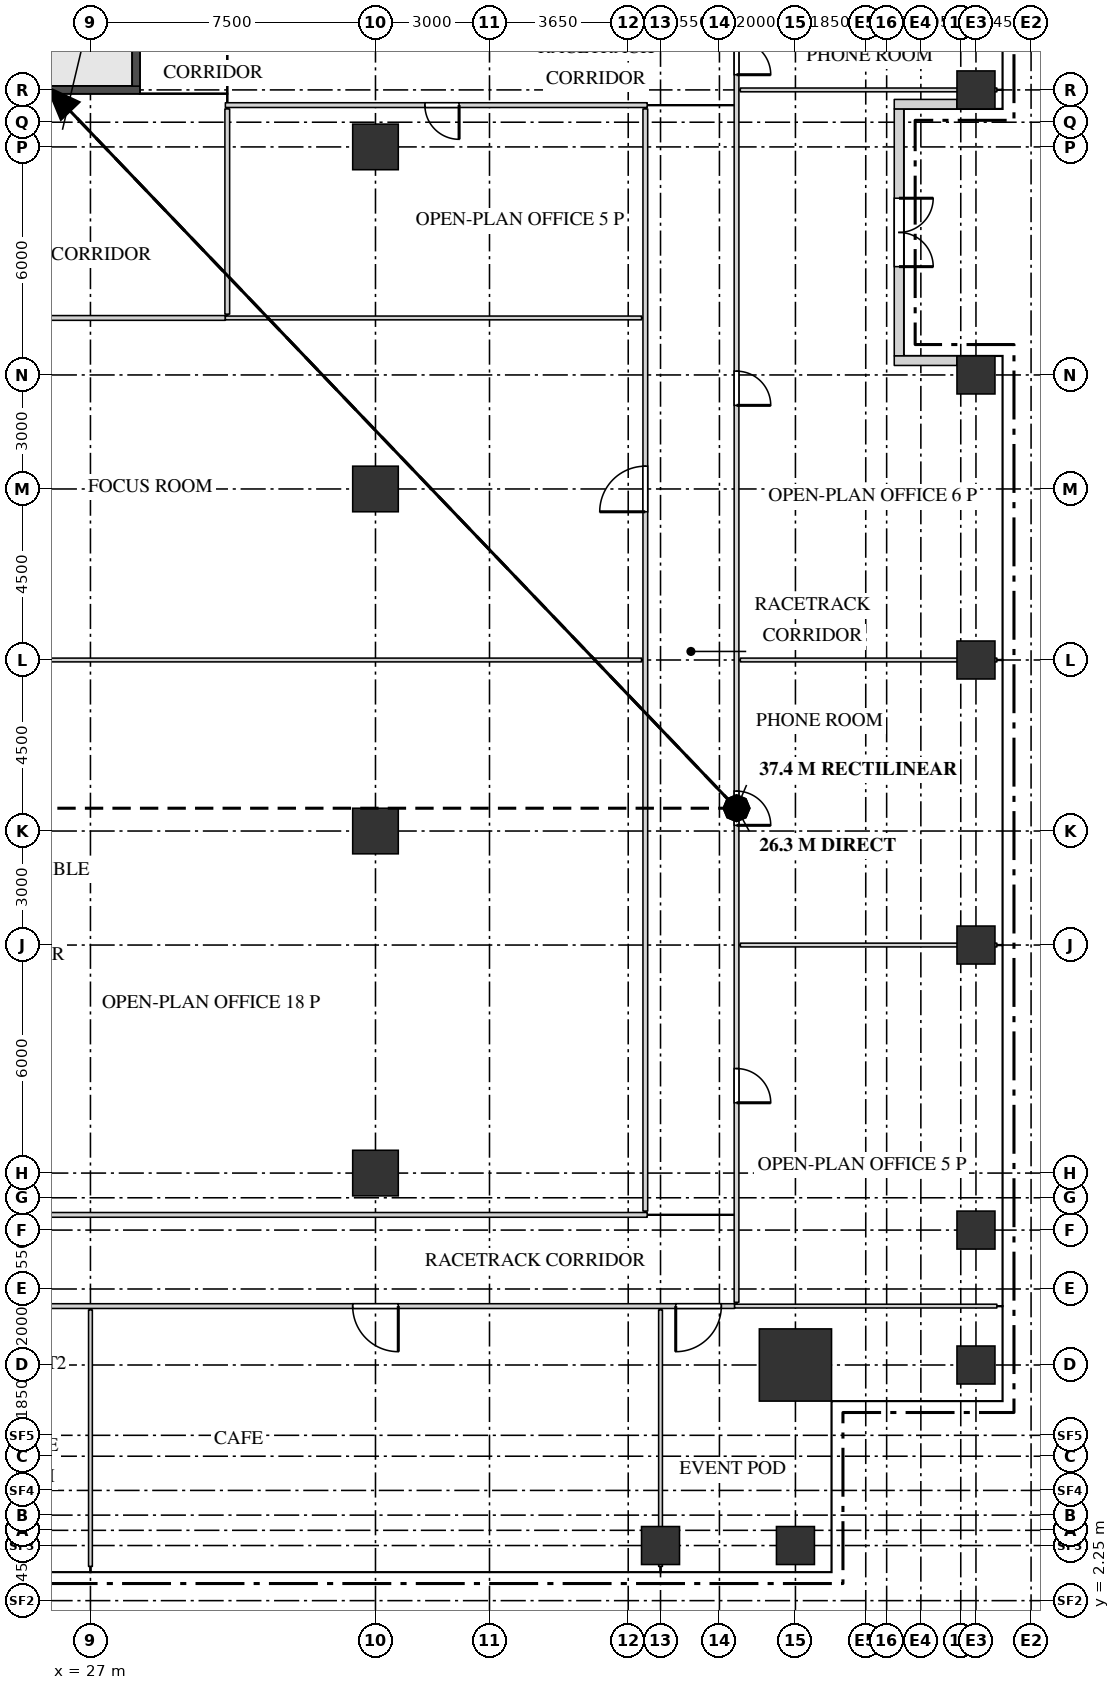
"""IFC4 building model, lengths in metres.
Left out: names, types, materials, properties, quantities, classifications, styles, units other than length and angle.
Written with IfcOpenShell. Run it as: python <this file> out.ifc"""

import sys

from ifc_helpers import new_model, si_unit, direction, frame, frame_2d, origin, origin_2d, place, context, subcontext, project, spatial, rectangle, extrude, source, transform, mapped, element, fill, save


model = new_model("IFC4")
c1 = context("Model", 3, precision=1e-05, world=origin(), true_north=direction((0.0, 1.0)))
c2 = subcontext(c1, "Body", "Model", "MODEL_VIEW")
j1 = project(units=[si_unit("LENGTHUNIT", "METRE"), si_unit("PLANEANGLEUNIT", "RADIAN")], contexts=[c1])
p1 = place(None, origin())
s1 = spatial("IfcSite", under=j1, at=p1, CompositionType="ELEMENT")
p2 = place(p1, origin())
s2 = spatial("IfcBuilding", under=s1, at=p2, CompositionType="ELEMENT")
p3 = place(p2, frame((0.0, 0.0, 188.7)))
s3 = spatial("IfcBuildingStorey", under=s2, at=p3, CompositionType="ELEMENT", Elevation=188.7)
m1 = source(origin(), c2, "Body", "SweptSolid", [
    extrude(rectangle(XDim=7.1, YDim=0.2, at=frame_2d((3.55, 0.0))), origin(), (0.0, 0.0, 1.0), 3.75),
])
p4 = place(p3, frame((21.2, 42.0, 0.0), z_axis=(0.0, 0.0, 1.0), x_axis=(1.0, 0.0, 0.0)))
e1 = element("IfcWall", 1, at=p4, inside=s3, PredefinedType="SHEAR", context=c2, shape_type="MappedRepresentation", body=[
    mapped(m1, transform((0.0, 0.0, 0.0))),
])
m2 = source(origin(), c2, "Body", "SweptSolid", [
    extrude(rectangle(XDim=3.35, YDim=0.2, at=frame_2d((1.675, 0.0))), origin(), (0.0, 0.0, 1.0), 3.75),
])
p5 = place(p3, frame((28.2, 42.1, 0.0), z_axis=(0.0, 0.0, 1.0), x_axis=(0.0, 1.0, 0.0)))
e2 = element("IfcWall", 2, at=p5, inside=s3, PredefinedType="SHEAR", context=c2, shape_type="MappedRepresentation", body=[
    mapped(m2, transform((0.0, 0.0, 0.0))),
])
m3 = source(origin(), c2, "Body", "SweptSolid", [
    extrude(rectangle(XDim=1.9, YDim=1.9, at=origin_2d()), origin(), (0.0, 0.0, 1.0), 4.0),
])
p6 = place(p3, frame((45.55, 8.45, 0.0), z_axis=(0.0, 0.0, 1.0), x_axis=(1.0, 0.0, 0.0)))
e3 = element("IfcColumn", 3, at=p6, inside=s3, PredefinedType="COLUMN", context=c2, shape_type="MappedRepresentation", body=[
    mapped(m3, transform((0.0, 0.0, 0.0))),
])
m4 = source(origin(), c2, "Body", "SweptSolid", [
    extrude(rectangle(XDim=1.0, YDim=1.0, at=origin_2d()), origin(), (0.0, 0.0, 1.0), 3.75),
])
for number, where, z_axis, x_axis in (
    (4, (42.0, 3.7, 0.0), (0.0, 0.0, 1.0), (1.0, 0.0, 0.0)),
    (5, (45.55, 3.7, 0.0), (0.0, 0.0, 1.0), (1.0, 0.0, 0.0)),
    (6, (50.3, 8.45, 0.0), (0.0, 0.0, 1.0), (1.0, 0.0, 0.0)),
    (7, (50.3, 12.0, 0.0), (0.0, 0.0, 1.0), (1.0, 0.0, 0.0)),
    (8, (50.3, 19.5, 0.0), (0.0, 0.0, 1.0), (1.0, 0.0, 0.0)),
    (9, (50.3, 27.0, 0.0), (0.0, 0.0, 1.0), (1.0, 0.0, 0.0)),
    (10, (50.3, 34.5, 0.0), (0.0, 0.0, 1.0), (1.0, 0.0, 0.0)),
    (11, (50.3, 42.0, 0.0), (0.0, 0.0, 1.0), (1.0, 0.0, 0.0)),
):
    element("IfcColumn", number, at=place(p3, frame(where, z_axis=z_axis, x_axis=x_axis)), inside=s3, PredefinedType="COLUMN", context=c2, shape_type="MappedRepresentation", body=[
        mapped(m4, transform((0.0, 0.0, 0.0))),
    ])
m5 = source(origin(), c2, "Body", "SweptSolid", [
    extrude(rectangle(XDim=1.2, YDim=1.2, at=origin_2d()), origin(), (0.0, 0.0, 1.0), 3.75),
])
for number, where, z_axis, x_axis in (
    (12, (34.5, 13.5, 0.0), (0.0, 0.0, 1.0), (1.0, 0.0, 0.0)),
    (13, (34.5, 22.5, 0.0), (0.0, 0.0, 1.0), (1.0, 0.0, 0.0)),
    (14, (34.5, 31.5, 0.0), (0.0, 0.0, 1.0), (1.0, 0.0, 0.0)),
    (15, (34.5, 40.5, 0.0), (0.0, 0.0, 1.0), (1.0, 0.0, 0.0)),
):
    element("IfcColumn", number, at=place(p3, frame(where, z_axis=z_axis, x_axis=x_axis)), inside=s3, PredefinedType="COLUMN", context=c2, shape_type="MappedRepresentation", body=[
        mapped(m5, transform((0.0, 0.0, 0.0))),
    ])
m6 = source(origin(), c2, "Body", "SweptSolid", [
    extrude(rectangle(XDim=6.5, YDim=0.25, at=frame_2d((3.25, 0.0))), origin(), (0.0, 0.0, 1.0), 3.15),
])
p7 = place(p3, frame((48.275, 35.0, 0.0), z_axis=(0.0, 0.0, 1.0), x_axis=(0.0, 1.0, 0.0)))
e16 = element("IfcWall", 16, at=p7, inside=s3, PredefinedType="SOLIDWALL", context=c2, shape_type="MappedRepresentation", body=[
    mapped(m6, transform((0.0, 0.0, 0.0))),
])
m7 = source(origin(), c2, "Body", "SweptSolid", [
    extrude(rectangle(XDim=1.75, YDim=2.4, at=frame_2d((0.875, 1.2))), frame((0.0, 0.135, 0.0), z_axis=(0.0, -1.0, 0.0), x_axis=(1.0, 0.0, 0.0)), (0.0, 0.0, 1.0), 0.27),
])
p8 = place(p7, frame((0.3, 0.0, 0.0)))
e17 = element("IfcOpeningElement", 17, at=p8, cuts=e16, PredefinedType="OPENING", context=c2, shape_type="MappedRepresentation", body=[
    mapped(m7, transform((0.0, 0.0, 0.0))),
])
p9 = place(p7, frame((4.45, 0.0, 0.0)))
e18 = element("IfcOpeningElement", 18, at=p9, cuts=e16, PredefinedType="OPENING", context=c2, shape_type="MappedRepresentation", body=[
    mapped(m7, transform((0.0, 0.0, 0.0))),
])
m8 = source(origin(), c2, "Body", "SweptSolid", [
    extrude(rectangle(XDim=1.8, YDim=2.4, at=frame_2d((0.9, 1.2))), frame((0.0, 0.135, 0.0), z_axis=(0.0, -1.0, 0.0), x_axis=(1.0, 0.0, 0.0)), (0.0, 0.0, 1.0), 0.27),
])
p10 = place(p7, frame((2.35, 0.0, 0.0)))
e19 = element("IfcOpeningElement", 19, at=p10, cuts=e16, PredefinedType="OPENING", context=c2, shape_type="MappedRepresentation", body=[
    mapped(m8, transform((0.0, 0.0, 0.0))),
])
m9 = source(origin(), c2, "Body", "SweptSolid", [
    extrude(rectangle(XDim=1.65, YDim=0.25, at=frame_2d((0.825, 0.0))), origin(), (0.0, 0.0, 1.0), 3.15),
])
for number, where, z_axis, x_axis in (
    (20, (49.8, 34.875, 0.0), (0.0, 0.0, 1.0), (-1.0, 0.0, 0.0)),
    (21, (49.8, 41.625, 0.0), (0.0, 0.0, 1.0), (-1.0, 0.0, 0.0)),
):
    element("IfcWall", number, at=place(p3, frame(where, z_axis=z_axis, x_axis=x_axis)), inside=s3, PredefinedType="SOLIDWALL", context=c2, shape_type="MappedRepresentation", body=[
        mapped(m9, transform((0.0, 0.0, 0.0))),
    ])
m10 = source(origin(), c2, "Body", "SweptSolid", [
    extrude(rectangle(XDim=6.75, YDim=0.1, at=frame_2d((3.375, 0.0))), origin(), (0.0, 0.0, 1.0), 3.3),
])
for number, where, z_axis, x_axis in (
    (22, (27.0, 3.15, 0.0), (0.0, 0.0, 1.0), (0.0, 1.0, 0.0)),
    (23, (42.0, 3.15, 0.0), (0.0, 0.0, 1.0), (0.0, 1.0, 0.0)),
):
    element("IfcWall", number, at=place(p3, frame(where, z_axis=z_axis, x_axis=x_axis)), inside=s3, PredefinedType="PARTITIONING", context=c2, shape_type="MappedRepresentation", body=[
        mapped(m10, transform((0.0, 0.0, 0.0))),
    ])
m11 = source(origin(), c2, "Body", "SweptSolid", [
    extrude(rectangle(XDim=20.6, YDim=0.125, at=frame_2d((10.3, 0.0))), origin(), (0.0, 0.0, 1.0), 3.8),
])
p11 = place(p3, frame((23.35, 10.0, 0.0), z_axis=(0.0, 0.0, 1.0), x_axis=(1.0, 0.0, 0.0)))
e24 = element("IfcWall", 24, at=p11, inside=s3, PredefinedType="PARTITIONING", context=c2, shape_type="MappedRepresentation", body=[
    mapped(m11, transform((0.0, 0.0, 0.0))),
])
m12 = source(origin(), c2, "Body", "SweptSolid", [
    extrude(rectangle(XDim=0.9, YDim=2.1, at=frame_2d((0.45, 1.05))), frame((0.0, 0.073, 0.0), z_axis=(0.0, -1.0, 0.0), x_axis=(1.0, 0.0, 0.0)), (0.0, 0.0, 1.0), 0.145),
])
p12 = place(p11, frame((1.25, 0.0, 0.0)))
e25 = element("IfcOpeningElement", 25, at=p12, cuts=e24, PredefinedType="OPENING", context=c2, shape_type="MappedRepresentation", body=[
    mapped(m12, transform((0.0, 0.0, 0.0))),
])
m13 = source(origin(), c2, "Body", "SweptSolid", [
    extrude(rectangle(XDim=1.2, YDim=2.1, at=frame_2d((0.6, 1.05))), frame((0.0, 0.073, 0.0), z_axis=(0.0, -1.0, 0.0), x_axis=(1.0, 0.0, 0.0)), (0.0, 0.0, 1.0), 0.145),
])
p13 = place(p11, frame((10.55, 0.0, 0.0)))
e26 = element("IfcOpeningElement", 26, at=p13, cuts=e24, PredefinedType="OPENING", context=c2, shape_type="MappedRepresentation", body=[
    mapped(m13, transform((0.0, 0.0, 0.0))),
])
p14 = place(p11, frame((19.05, 0.0, 0.0)))
e27 = element("IfcOpeningElement", 27, at=p14, cuts=e24, PredefinedType="OPENING", context=c2, shape_type="MappedRepresentation", body=[
    mapped(m13, transform((0.0, 0.0, 0.0))),
])
m14 = source(origin(), c2, "Body", "SweptSolid", [
    extrude(rectangle(XDim=6.9, YDim=0.1, at=frame_2d((3.45, 0.0))), origin(), (0.0, 0.0, 1.0), 3.8),
])
p15 = place(p3, frame((43.95, 10.0, 0.0), z_axis=(0.0, 0.0, 1.0), x_axis=(1.0, 0.0, 0.0)))
e28 = element("IfcWall", 28, at=p15, inside=s3, PredefinedType="PARTITIONING", context=c2, shape_type="MappedRepresentation", body=[
    mapped(m14, transform((0.0, 0.0, 0.0))),
])
m15 = source(origin(), c2, "Body", "SweptSolid", [
    extrude(rectangle(XDim=33.8, YDim=0.125, at=frame_2d((16.9, 0.0))), origin(), (0.0, 0.0, 1.0), 3.8),
])
p16 = place(p3, frame((44.0, 10.1, 0.0), z_axis=(0.0, 0.0, 1.0), x_axis=(0.0, 1.0, 0.0)))
e29 = element("IfcWall", 29, at=p16, inside=s3, PredefinedType="PARTITIONING", context=c2, shape_type="MappedRepresentation", body=[
    mapped(m15, transform((0.0, 0.0, 0.0))),
])
p17 = place(p16, frame((5.25, 0.0, 0.0)))
e30 = element("IfcOpeningElement", 30, at=p17, cuts=e29, PredefinedType="OPENING", context=c2, shape_type="MappedRepresentation", body=[
    mapped(m12, transform((0.0, 0.0, 0.0))),
])
p18 = place(p16, frame((12.55, 0.0, 0.0)))
e31 = element("IfcOpeningElement", 31, at=p18, cuts=e29, PredefinedType="OPENING", context=c2, shape_type="MappedRepresentation", body=[
    mapped(m12, transform((0.0, 0.0, 0.0))),
])
p19 = place(p16, frame((23.6, 0.0, 0.0)))
e32 = element("IfcOpeningElement", 32, at=p19, cuts=e29, PredefinedType="OPENING", context=c2, shape_type="MappedRepresentation", body=[
    mapped(m12, transform((0.0, 0.0, 0.0))),
])
p20 = place(p16, frame((32.3, 0.0, 0.0)))
e33 = element("IfcOpeningElement", 33, at=p20, cuts=e29, PredefinedType="OPENING", context=c2, shape_type="MappedRepresentation", body=[
    mapped(m12, transform((0.0, 0.0, 0.0))),
])
m16 = source(origin(), c2, "Body", "SweptSolid", [
    extrude(rectangle(XDim=18.3, YDim=0.125, at=frame_2d((9.15, 0.0))), origin(), (0.0, 0.0, 1.0), 3.8),
])
p21 = place(p3, frame((23.35, 12.4, 0.0), z_axis=(0.0, 0.0, 1.0), x_axis=(1.0, 0.0, 0.0)))
e34 = element("IfcWall", 34, at=p21, inside=s3, PredefinedType="PARTITIONING", context=c2, shape_type="MappedRepresentation", body=[
    mapped(m16, transform((0.0, 0.0, 0.0))),
])
m17 = source(origin(), c2, "Body", "SweptSolid", [
    extrude(rectangle(XDim=29.0, YDim=0.125, at=frame_2d((14.5, 0.0))), origin(), (0.0, 0.0, 1.0), 3.8),
])
p22 = place(p3, frame((41.6, 12.5, 0.0), z_axis=(0.0, 0.0, 1.0), x_axis=(0.0, 1.0, 0.0)))
e35 = element("IfcWall", 35, at=p22, inside=s3, PredefinedType="PARTITIONING", context=c2, shape_type="MappedRepresentation", body=[
    mapped(m17, transform((0.0, 0.0, 0.0))),
])
p23 = place(p22, frame((18.4, 0.0, 0.0)))
e36 = element("IfcOpeningElement", 36, at=p23, cuts=e35, PredefinedType="OPENING", context=c2, shape_type="MappedRepresentation", body=[
    mapped(m13, transform((0.0, 0.0, 0.0))),
])
m18 = source(origin(), c2, "Body", "SweptSolid", [
    extrude(rectangle(XDim=6.75, YDim=0.1, at=frame_2d((3.375, 0.0))), origin(), (0.0, 0.0, 1.0), 3.8),
])
p24 = place(p3, frame((44.1, 19.5, 0.0), z_axis=(0.0, 0.0, 1.0), x_axis=(1.0, 0.0, 0.0)))
e37 = element("IfcWall", 37, at=p24, inside=s3, PredefinedType="PARTITIONING", context=c2, shape_type="MappedRepresentation", body=[
    mapped(m18, transform((0.0, 0.0, 0.0))),
])
m19 = source(origin(), c2, "Body", "SweptSolid", [
    extrude(rectangle(XDim=18.0, YDim=0.1, at=frame_2d((9.0, 0.0))), origin(), (0.0, 0.0, 1.0), 3.8),
])
p25 = place(p3, frame((23.5, 27.0, 0.0), z_axis=(0.0, 0.0, 1.0), x_axis=(1.0, 0.0, 0.0)))
e38 = element("IfcWall", 38, at=p25, inside=s3, PredefinedType="PARTITIONING", context=c2, shape_type="MappedRepresentation", body=[
    mapped(m19, transform((0.0, 0.0, 0.0))),
])
p26 = place(p3, frame((44.1, 27.0, 0.0), z_axis=(0.0, 0.0, 1.0), x_axis=(1.0, 0.0, 0.0)))
e39 = element("IfcWall", 39, at=p26, inside=s3, PredefinedType="PARTITIONING", context=c2, shape_type="MappedRepresentation", body=[
    mapped(m18, transform((0.0, 0.0, 0.0))),
])
m20 = source(origin(), c2, "Body", "SweptSolid", [
    extrude(rectangle(XDim=7.2, YDim=0.125, at=frame_2d((3.6, 0.0))), origin(), (0.0, 0.0, 1.0), 3.8),
])
p27 = place(p3, frame((23.35, 36.0, 0.0), z_axis=(0.0, 0.0, 1.0), x_axis=(1.0, 0.0, 0.0)))
e40 = element("IfcWall", 40, at=p27, inside=s3, PredefinedType="PARTITIONING", context=c2, shape_type="MappedRepresentation", body=[
    mapped(m20, transform((0.0, 0.0, 0.0))),
])
m21 = source(origin(), c2, "Body", "SweptSolid", [
    extrude(rectangle(XDim=10.95, YDim=0.1, at=frame_2d((5.475, 0.0))), origin(), (0.0, 0.0, 1.0), 3.8),
])
p28 = place(p3, frame((30.55, 36.0, 0.0), z_axis=(0.0, 0.0, 1.0), x_axis=(1.0, 0.0, 0.0)))
e41 = element("IfcWall", 41, at=p28, inside=s3, PredefinedType="PARTITIONING", context=c2, shape_type="MappedRepresentation", body=[
    mapped(m21, transform((0.0, 0.0, 0.0))),
])
m22 = source(origin(), c2, "Body", "SweptSolid", [
    extrude(rectangle(XDim=5.4, YDim=0.125, at=frame_2d((2.7, 0.0))), origin(), (0.0, 0.0, 1.0), 3.8),
])
p29 = place(p3, frame((30.6, 36.1, 0.0), z_axis=(0.0, 0.0, 1.0), x_axis=(0.0, 1.0, 0.0)))
e42 = element("IfcWall", 42, at=p29, inside=s3, PredefinedType="PARTITIONING", context=c2, shape_type="MappedRepresentation", body=[
    mapped(m22, transform((0.0, 0.0, 0.0))),
])
m23 = source(origin(), c2, "Body", "SweptSolid", [
    extrude(rectangle(XDim=11.1, YDim=0.125, at=frame_2d((5.55, 0.0))), origin(), (0.0, 0.0, 1.0), 3.8),
])
p30 = place(p3, frame((30.55, 41.6, 0.0), z_axis=(0.0, 0.0, 1.0), x_axis=(1.0, 0.0, 0.0)))
e43 = element("IfcWall", 43, at=p30, inside=s3, PredefinedType="PARTITIONING", context=c2, shape_type="MappedRepresentation", body=[
    mapped(m23, transform((0.0, 0.0, 0.0))),
])
p31 = place(p30, frame((5.25, 0.0, 0.0)))
e44 = element("IfcOpeningElement", 44, at=p31, cuts=e43, PredefinedType="OPENING", context=c2, shape_type="MappedRepresentation", body=[
    mapped(m12, transform((0.0, 0.0, 0.0))),
])
p32 = place(p3, frame((44.1, 42.0, 0.0), z_axis=(0.0, 0.0, 1.0), x_axis=(1.0, 0.0, 0.0)))
e45 = element("IfcWall", 45, at=p32, inside=s3, PredefinedType="PARTITIONING", context=c2, shape_type="MappedRepresentation", body=[
    mapped(m18, transform((0.0, 0.0, 0.0))),
])
m24 = source(origin(), c2, "Body", "SweptSolid", [
    extrude(rectangle(XDim=1.75, YDim=2.4, at=frame_2d((0.875, 1.2))), frame((0.0, 0.03, 0.0), z_axis=(0.0, -1.0, 0.0), x_axis=(1.0, 0.0, 0.0)), (0.0, 0.0, 1.0), 0.06),
])
p33 = place(p8, origin())
e46 = element("IfcWindow", 46, at=p33, inside=s3, PartitioningType="SINGLE_PANEL", PredefinedType="WINDOW", context=c2, shape_type="MappedRepresentation", body=[
    mapped(m24, transform((0.0, 0.0, 0.0))),
])
fill(e17, e46)
p34 = place(p9, origin())
e47 = element("IfcWindow", 47, at=p34, inside=s3, PartitioningType="SINGLE_PANEL", PredefinedType="WINDOW", context=c2, shape_type="MappedRepresentation", body=[
    mapped(m24, transform((0.0, 0.0, 0.0))),
])
fill(e18, e47)
m25 = source(origin(), c2, "Body", "SweptSolid", [
    extrude(rectangle(XDim=1.8, YDim=2.4, at=frame_2d((0.9, 1.2))), frame((0.0, 0.025, 0.0), z_axis=(0.0, -1.0, 0.0), x_axis=(1.0, 0.0, 0.0)), (0.0, 0.0, 1.0), 0.05),
])
p35 = place(p10, origin())
e48 = element("IfcDoor", 48, at=p35, inside=s3, OperationType="DOUBLE_DOOR_DOUBLE_SWING", PredefinedType="DOOR", context=c2, shape_type="MappedRepresentation", body=[
    mapped(m25, transform((0.0, 0.0, 0.0))),
])
fill(e19, e48)
m26 = source(origin(), c2, "Body", "SweptSolid", [
    extrude(rectangle(XDim=1.2, YDim=2.1, at=frame_2d((0.6, 1.05))), frame((0.0, 0.025, 0.0), z_axis=(0.0, -1.0, 0.0), x_axis=(1.0, 0.0, 0.0)), (0.0, 0.0, 1.0), 0.05),
])
p36 = place(p13, origin())
e49 = element("IfcDoor", 49, at=p36, inside=s3, OperationType="SINGLE_SWING_RIGHT", PredefinedType="DOOR", context=c2, shape_type="MappedRepresentation", body=[
    mapped(m26, transform((0.0, 0.0, 0.0))),
])
fill(e26, e49)
p37 = place(p14, origin())
e50 = element("IfcDoor", 50, at=p37, inside=s3, OperationType="SINGLE_SWING_LEFT", PredefinedType="DOOR", context=c2, shape_type="MappedRepresentation", body=[
    mapped(m26, transform((0.0, 0.0, 0.0))),
])
fill(e27, e50)
m27 = source(origin(), c2, "Body", "SweptSolid", [
    extrude(rectangle(XDim=0.9, YDim=2.1, at=frame_2d((0.45, 1.05))), frame((0.0, 0.025, 0.0), z_axis=(0.0, -1.0, 0.0), x_axis=(1.0, 0.0, 0.0)), (0.0, 0.0, 1.0), 0.05),
])
p38 = place(p17, origin())
e51 = element("IfcDoor", 51, at=p38, inside=s3, OperationType="SINGLE_SWING_LEFT", PredefinedType="DOOR", context=c2, shape_type="MappedRepresentation", body=[
    mapped(m27, transform((0.0, 0.0, 0.0))),
])
fill(e30, e51)
p39 = place(p18, origin())
e52 = element("IfcDoor", 52, at=p39, inside=s3, OperationType="SINGLE_SWING_LEFT", PredefinedType="DOOR", context=c2, shape_type="MappedRepresentation", body=[
    mapped(m27, transform((0.0, 0.0, 0.0))),
])
fill(e31, e52)
p40 = place(p19, origin())
e53 = element("IfcDoor", 53, at=p40, inside=s3, OperationType="SINGLE_SWING_LEFT", PredefinedType="DOOR", context=c2, shape_type="MappedRepresentation", body=[
    mapped(m27, transform((0.0, 0.0, 0.0))),
])
fill(e32, e53)
p41 = place(p20, origin())
e54 = element("IfcDoor", 54, at=p41, inside=s3, OperationType="SINGLE_SWING_LEFT", PredefinedType="DOOR", context=c2, shape_type="MappedRepresentation", body=[
    mapped(m27, transform((0.0, 0.0, 0.0))),
])
fill(e33, e54)
p42 = place(p23, origin())
e55 = element("IfcDoor", 55, at=p42, inside=s3, OperationType="SINGLE_SWING_RIGHT", PredefinedType="DOOR", context=c2, shape_type="MappedRepresentation", body=[
    mapped(m26, transform((0.0, 0.0, 0.0))),
])
fill(e36, e55)
p43 = place(p31, origin())
e56 = element("IfcDoor", 56, at=p43, inside=s3, OperationType="SINGLE_SWING_RIGHT", PredefinedType="DOOR", context=c2, shape_type="MappedRepresentation", body=[
    mapped(m27, transform((0.0, 0.0, 0.0))),
])
fill(e44, e56)
save(model, sys.argv[1])
